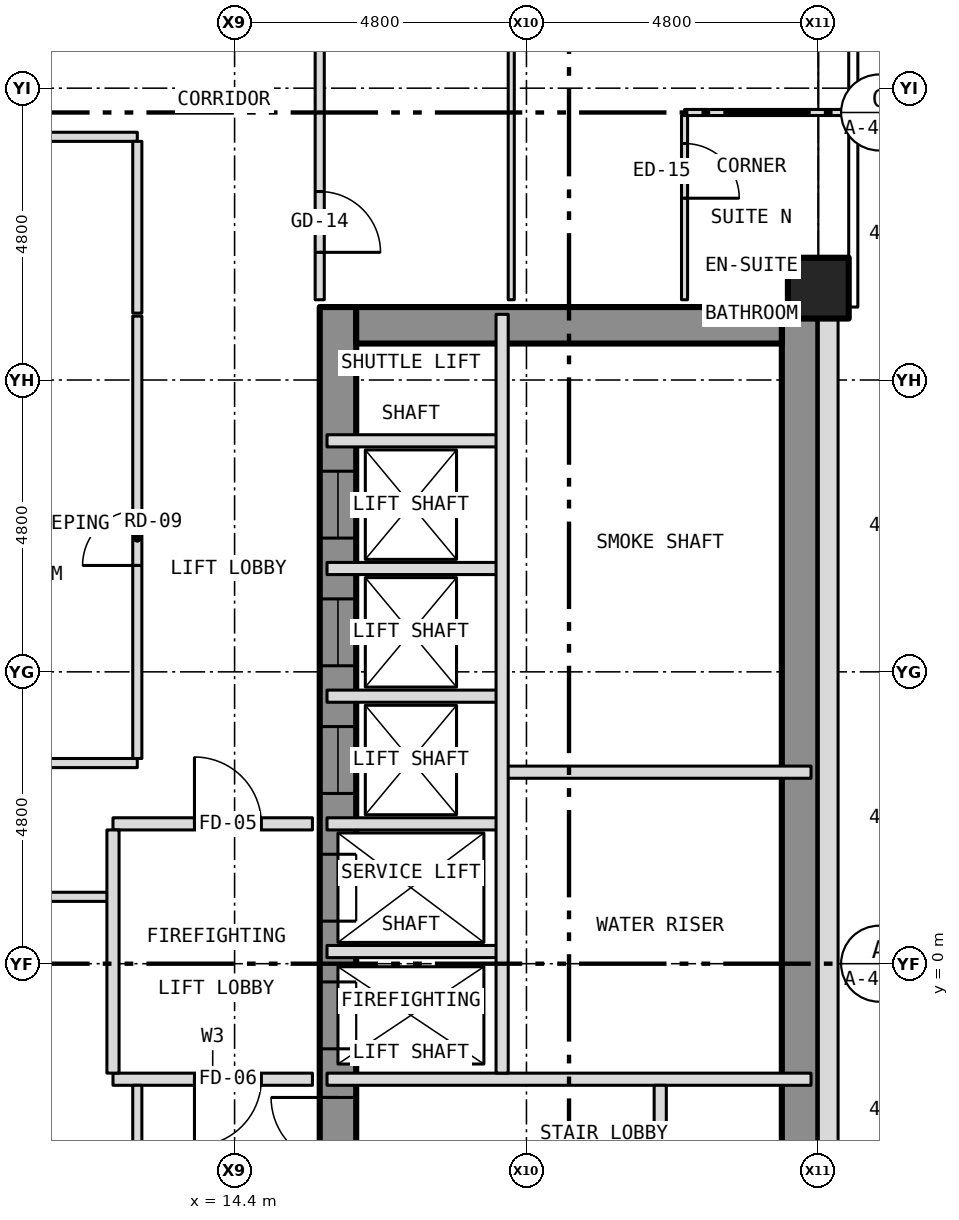
"""IFC4 building model, lengths in metres.
Left out: names, types, materials, properties, quantities, classifications, styles, units other than length and angle.
Written with IfcOpenShell. Run it as: python <this file> out.ifc"""

import sys

from ifc_helpers import new_model, si_unit, direction, frame, frame_2d, origin, origin_2d, place, context, subcontext, project, spatial, rectangle, hollow_rectangle, extrude, element, fill, save


model = new_model("IFC4")
c1 = context("Model", 3, precision=1e-05, world=origin(), true_north=direction((0.0, 1.0)))
c2 = subcontext(c1, "Body", "Model", "MODEL_VIEW")
j1 = project(units=[si_unit("LENGTHUNIT", "METRE"), si_unit("PLANEANGLEUNIT", "RADIAN")], contexts=[c1])
p1 = place(None, origin())
s1 = spatial("IfcSite", under=j1, at=p1, CompositionType="ELEMENT")
p2 = place(p1, origin())
s2 = spatial("IfcBuilding", under=s1, at=p2, CompositionType="ELEMENT")
p3 = place(p2, frame((0.0, 0.0, 46.0)))
s3 = spatial("IfcBuildingStorey", under=s2, at=p3, CompositionType="ELEMENT", Elevation=46.0)
p4 = place(p3, frame((24.0, 11.111, -0.15), z_axis=(0.0, 0.0, 1.0), x_axis=(1.0, 0.0, 0.0)))
e1 = element("IfcColumn", 1, at=p4, inside=s3, PredefinedType="COLUMN", context=c2, shape_type="SweptSolid", body=[
    extrude(hollow_rectangle(XDim=1.0, YDim=1.0, WallThickness=0.06, at=origin_2d()), origin(), (0.0, 0.0, 1.0), 3.5),
])
p5 = place(p3, frame((16.1, -10.8, 0.0), z_axis=(0.0, 0.0, 1.0), x_axis=(0.0, 1.0, 0.0)))
e2 = element("IfcWall", 2, at=p5, inside=s3, PredefinedType="SHEAR", context=c2, shape_type="SweptSolid", body=[
    extrude(rectangle(XDim=21.6, YDim=0.6, at=frame_2d((10.8, 0.0))), origin(), (0.0, 0.0, 1.0), 3.25),
])
p6 = place(p5, frame((9.4, 0.0, 0.0)))
e3 = element("IfcOpeningElement", 3, at=p6, cuts=e2, PredefinedType="OPENING", context=c2, shape_type="SweptSolid", body=[
    extrude(rectangle(XDim=1.1, YDim=2.1, at=frame_2d((0.55, 1.05))), frame((0.0, 0.312, 0.0), z_axis=(0.0, -1.0, 0.0), x_axis=(1.0, 0.0, 0.0)), (0.0, 0.0, 1.0), 0.624),
])
p7 = place(p5, frame((11.5, 0.0, 0.0)))
e4 = element("IfcOpeningElement", 4, at=p7, cuts=e2, PredefinedType="OPENING", context=c2, shape_type="SweptSolid", body=[
    extrude(rectangle(XDim=1.1, YDim=2.1, at=frame_2d((0.55, 1.05))), frame((0.0, 0.312, 0.0), z_axis=(0.0, -1.0, 0.0), x_axis=(1.0, 0.0, 0.0)), (0.0, 0.0, 1.0), 0.624),
])
p8 = place(p5, frame((13.6, 0.0, 0.0)))
e5 = element("IfcOpeningElement", 5, at=p8, cuts=e2, PredefinedType="OPENING", context=c2, shape_type="SweptSolid", body=[
    extrude(rectangle(XDim=1.1, YDim=2.1, at=frame_2d((0.55, 1.05))), frame((0.0, 0.312, 0.0), z_axis=(0.0, -1.0, 0.0), x_axis=(1.0, 0.0, 0.0)), (0.0, 0.0, 1.0), 0.624),
])
p9 = place(p5, frame((15.7, 0.0, 0.0)))
e6 = element("IfcOpeningElement", 6, at=p9, cuts=e2, PredefinedType="OPENING", context=c2, shape_type="SweptSolid", body=[
    extrude(rectangle(XDim=1.1, YDim=2.1, at=frame_2d((0.55, 1.05))), frame((0.0, 0.312, 0.0), z_axis=(0.0, -1.0, 0.0), x_axis=(1.0, 0.0, 0.0)), (0.0, 0.0, 1.0), 0.624),
])
p10 = place(p5, frame((17.8, 0.0, 0.0)))
e7 = element("IfcOpeningElement", 7, at=p10, cuts=e2, PredefinedType="OPENING", context=c2, shape_type="SweptSolid", body=[
    extrude(rectangle(XDim=1.1, YDim=2.1, at=frame_2d((0.55, 1.05))), frame((0.0, 0.312, 0.0), z_axis=(0.0, -1.0, 0.0), x_axis=(1.0, 0.0, 0.0)), (0.0, 0.0, 1.0), 0.624),
])
p11 = place(p5, frame((5.642, 0.0, 0.0)))
e8 = element("IfcOpeningElement", 8, at=p11, cuts=e2, PredefinedType="OPENING", context=c2, shape_type="SweptSolid", body=[
    extrude(rectangle(XDim=1.1, YDim=2.1, at=frame_2d((0.55, 1.05))), frame((0.0, 0.312, 0.0), z_axis=(0.0, -1.0, 0.0), x_axis=(1.0, 0.0, 0.0)), (0.0, 0.0, 1.0), 0.624),
])
p12 = place(p5, frame((7.5, 0.0, 0.0)))
e9 = element("IfcOpeningElement", 9, at=p12, cuts=e2, PredefinedType="OPENING", context=c2, shape_type="SweptSolid", body=[
    extrude(rectangle(XDim=1.1, YDim=2.1, at=frame_2d((0.55, 1.05))), frame((0.0, 0.312, 0.0), z_axis=(0.0, -1.0, 0.0), x_axis=(1.0, 0.0, 0.0)), (0.0, 0.0, 1.0), 0.624),
])
p13 = place(p3, frame((23.7, -10.8, 0.0), z_axis=(0.0, 0.0, 1.0), x_axis=(0.0, 1.0, 0.0)))
e10 = element("IfcWall", 10, at=p13, inside=s3, PredefinedType="SHEAR", context=c2, shape_type="SweptSolid", body=[
    extrude(rectangle(XDim=21.6, YDim=0.6, at=frame_2d((10.8, 0.0))), origin(), (0.0, 0.0, 1.0), 3.25),
])
p14 = place(p3, frame((16.4, 10.5, 0.0), z_axis=(0.0, 0.0, 1.0), x_axis=(1.0, 0.0, 0.0)))
e11 = element("IfcWall", 11, at=p14, inside=s3, PredefinedType="SHEAR", context=c2, shape_type="SweptSolid", body=[
    extrude(rectangle(XDim=7.0, YDim=0.6, at=frame_2d((3.5, 0.0))), origin(), (0.0, 0.0, 1.0), 3.25),
])
p15 = place(p3, frame((24.163, -10.8, 0.0), z_axis=(0.0, 0.0, 1.0), x_axis=(0.0, 1.0, 0.0)))
e12 = element("IfcWall", 12, at=p15, inside=s3, PredefinedType="SOLIDWALL", context=c2, shape_type="SweptSolid", body=[
    extrude(rectangle(XDim=21.6, YDim=0.325, at=frame_2d((10.8, 0.0))), origin(), (0.0, 0.0, 1.0), 3.5),
])
p16 = place(p15, frame((2.95, 0.0, 1.0)))
e13 = element("IfcOpeningElement", 13, at=p16, cuts=e12, PredefinedType="OPENING", context=c2, shape_type="SweptSolid", body=[
    extrude(rectangle(XDim=0.6, YDim=1.5, at=frame_2d((0.3, 0.75))), frame((0.0, 0.175, 0.0), z_axis=(0.0, -1.0, 0.0), x_axis=(1.0, 0.0, 0.0)), (0.0, 0.0, 1.0), 0.349),
])
p17 = place(p3, frame((12.4, -1.9, 0.0), z_axis=(0.0, 0.0, 1.0), x_axis=(1.0, 0.0, 0.0)))
e14 = element("IfcWall", 14, at=p17, inside=s3, PredefinedType="PARTITIONING", context=c2, shape_type="SweptSolid", body=[
    extrude(rectangle(XDim=3.28, YDim=0.2, at=frame_2d((1.64, 0.0))), origin(), (0.0, 0.0, 1.0), 3.35),
])
p18 = place(p17, frame((1.34, 0.0, 0.0)))
e15 = element("IfcOpeningElement", 15, at=p18, cuts=e14, PredefinedType="OPENING", context=c2, shape_type="SweptSolid", body=[
    extrude(rectangle(XDim=1.1, YDim=2.1, at=frame_2d((0.55, 1.05))), frame((0.0, 0.112, 0.0), z_axis=(0.0, -1.0, 0.0), x_axis=(1.0, 0.0, 0.0)), (0.0, 0.0, 1.0), 0.224),
])
p19 = place(p3, frame((15.92, -1.9, 0.0), z_axis=(0.0, 0.0, 1.0), x_axis=(1.0, 0.0, 0.0)))
e16 = element("IfcWall", 16, at=p19, inside=s3, PredefinedType="PARTITIONING", context=c2, shape_type="SweptSolid", body=[
    extrude(rectangle(XDim=7.96, YDim=0.2, at=frame_2d((3.98, 0.0))), origin(), (0.0, 0.0, 1.0), 3.25),
])
p20 = place(p3, frame((15.92, 0.2, 0.0), z_axis=(0.0, 0.0, 1.0), x_axis=(1.0, 0.0, 0.0)))
e17 = element("IfcWall", 17, at=p20, inside=s3, PredefinedType="PARTITIONING", context=c2, shape_type="SweptSolid", body=[
    extrude(rectangle(XDim=2.88, YDim=0.2, at=frame_2d((1.44, 0.0))), origin(), (0.0, 0.0, 1.0), 3.25),
])
p21 = place(p3, frame((-12.4, 1.1, 0.0), z_axis=(0.0, 0.0, 1.0), x_axis=(1.0, 0.0, 0.0)))
e18 = element("IfcWall", 18, at=p21, inside=s3, PredefinedType="PARTITIONING", context=c2, shape_type="SweptSolid", body=[
    extrude(rectangle(XDim=24.8, YDim=0.15, at=frame_2d((12.4, 0.0))), origin(), (0.0, 0.0, 1.0), 3.35),
])
p22 = place(p3, frame((12.4, 2.3, 0.0), z_axis=(0.0, 0.0, 1.0), x_axis=(1.0, 0.0, 0.0)))
e19 = element("IfcWall", 19, at=p22, inside=s3, PredefinedType="PARTITIONING", context=c2, shape_type="SweptSolid", body=[
    extrude(rectangle(XDim=3.28, YDim=0.2, at=frame_2d((1.64, 0.0))), origin(), (0.0, 0.0, 1.0), 3.35),
])
p23 = place(p22, frame((1.34, 0.0, 0.0)))
e20 = element("IfcOpeningElement", 20, at=p23, cuts=e19, PredefinedType="OPENING", context=c2, shape_type="SweptSolid", body=[
    extrude(rectangle(XDim=1.1, YDim=2.1, at=frame_2d((0.55, 1.05))), frame((0.0, 0.112, 0.0), z_axis=(0.0, -1.0, 0.0), x_axis=(1.0, 0.0, 0.0)), (0.0, 0.0, 1.0), 0.224),
])
p24 = place(p3, frame((15.92, 2.3, 0.0), z_axis=(0.0, 0.0, 1.0), x_axis=(1.0, 0.0, 0.0)))
e21 = element("IfcWall", 21, at=p24, inside=s3, PredefinedType="PARTITIONING", context=c2, shape_type="SweptSolid", body=[
    extrude(rectangle(XDim=2.88, YDim=0.2, at=frame_2d((1.44, 0.0))), origin(), (0.0, 0.0, 1.0), 3.25),
])
p25 = place(p3, frame((18.8, 3.15, 0.0), z_axis=(0.0, 0.0, 1.0), x_axis=(1.0, 0.0, 0.0)))
e22 = element("IfcWall", 22, at=p25, inside=s3, PredefinedType="PARTITIONING", context=c2, shape_type="SweptSolid", body=[
    extrude(rectangle(XDim=5.08, YDim=0.2, at=frame_2d((2.54, 0.0))), origin(), (0.0, 0.0, 1.0), 3.25),
])
p26 = place(p3, frame((-12.8, 3.3, 0.0), z_axis=(0.0, 0.0, 1.0), x_axis=(1.0, 0.0, 0.0)))
e23 = element("IfcWall", 23, at=p26, inside=s3, PredefinedType="PARTITIONING", context=c2, shape_type="SweptSolid", body=[
    extrude(rectangle(XDim=25.6, YDim=0.15, at=frame_2d((12.8, 0.0))), origin(), (0.0, 0.0, 1.0), 3.35),
])
p27 = place(p26, frame((1.95, 0.0, 0.0)))
e24 = element("IfcOpeningElement", 24, at=p27, cuts=e23, PredefinedType="OPENING", context=c2, shape_type="SweptSolid", body=[
    extrude(rectangle(XDim=0.9, YDim=2.1, at=frame_2d((0.45, 1.05))), frame((0.0, 0.087, 0.0), z_axis=(0.0, -1.0, 0.0), x_axis=(1.0, 0.0, 0.0)), (0.0, 0.0, 1.0), 0.174),
])
for number, where, z_axis, x_axis in (
    (25, (15.92, 4.4, 0.0), (0.0, 0.0, 1.0), (1.0, 0.0, 0.0)),
    (26, (15.92, 6.5, 0.0), (0.0, 0.0, 1.0), (1.0, 0.0, 0.0)),
    (27, (15.92, 8.6, 0.0), (0.0, 0.0, 1.0), (1.0, 0.0, 0.0)),
):
    element("IfcWall", number, at=place(p3, frame(where, z_axis=z_axis, x_axis=x_axis)), inside=s3, PredefinedType="PARTITIONING", context=c2, shape_type="SweptSolid", body=[
        extrude(rectangle(XDim=2.88, YDim=0.2, at=frame_2d((1.44, 0.0))), origin(), (0.0, 0.0, 1.0), 3.25),
    ])
p28 = place(p3, frame((-12.8, 13.6, 0.0), z_axis=(0.0, 0.0, 1.0), x_axis=(1.0, 0.0, 0.0)))
e28 = element("IfcWall", 28, at=p28, inside=s3, PredefinedType="PARTITIONING", context=c2, shape_type="SweptSolid", body=[
    extrude(rectangle(XDim=25.6, YDim=0.15, at=frame_2d((12.8, 0.0))), origin(), (0.0, 0.0, 1.0), 3.35),
])
p29 = place(p28, frame((12.35, 0.0, 0.0)))
e29 = element("IfcOpeningElement", 29, at=p29, cuts=e28, PredefinedType="OPENING", context=c2, shape_type="SweptSolid", body=[
    extrude(rectangle(XDim=0.9, YDim=2.1, at=frame_2d((0.45, 1.05))), frame((0.0, 0.087, 0.0), z_axis=(0.0, -1.0, 0.0), x_axis=(1.0, 0.0, 0.0)), (0.0, 0.0, 1.0), 0.174),
])
p30 = place(p3, frame((21.8, 14.0, 0.0), z_axis=(0.0, 0.0, 1.0), x_axis=(1.0, 0.0, 0.0)))
e30 = element("IfcWall", 30, at=p30, inside=s3, PredefinedType="PARTITIONING", context=c2, shape_type="SweptSolid", body=[
    extrude(rectangle(XDim=2.73, YDim=0.1, at=frame_2d((1.365, 0.0))), origin(), (0.0, 0.0, 1.0), 3.35),
])
p31 = place(p3, frame((12.4, -1.8, 0.0), z_axis=(0.0, 0.0, 1.0), x_axis=(0.0, 1.0, 0.0)))
e31 = element("IfcWall", 31, at=p31, inside=s3, PredefinedType="PARTITIONING", context=c2, shape_type="SweptSolid", body=[
    extrude(rectangle(XDim=4.0, YDim=0.2, at=frame_2d((2.0, 0.0))), origin(), (0.0, 0.0, 1.0), 3.35),
])
p32 = place(p3, frame((12.8, -13.525, 0.0), z_axis=(0.0, 0.0, 1.0), x_axis=(0.0, 1.0, 0.0)))
e32 = element("IfcWall", 32, at=p32, inside=s3, PredefinedType="PARTITIONING", context=c2, shape_type="SweptSolid", body=[
    extrude(rectangle(XDim=11.525, YDim=0.15, at=frame_2d((5.762, 0.0))), origin(), (0.0, 0.0, 1.0), 3.35),
])
p33 = place(p32, frame((6.725, 0.0, 0.0)))
e33 = element("IfcOpeningElement", 33, at=p33, cuts=e32, PredefinedType="OPENING", context=c2, shape_type="SweptSolid", body=[
    extrude(rectangle(XDim=0.9, YDim=2.1, at=frame_2d((0.45, 1.05))), frame((0.0, 0.087, 0.0), z_axis=(0.0, -1.0, 0.0), x_axis=(1.0, 0.0, 0.0)), (0.0, 0.0, 1.0), 0.174),
])
p34 = place(p3, frame((12.8, 3.375, 0.0), z_axis=(0.0, 0.0, 1.0), x_axis=(0.0, 1.0, 0.0)))
e34 = element("IfcWall", 34, at=p34, inside=s3, PredefinedType="PARTITIONING", context=c2, shape_type="SweptSolid", body=[
    extrude(rectangle(XDim=7.275, YDim=0.15, at=frame_2d((3.637, 0.0))), origin(), (0.0, 0.0, 1.0), 3.35),
])
p35 = place(p34, frame((3.175, 0.0, 0.0)))
e35 = element("IfcOpeningElement", 35, at=p35, cuts=e34, PredefinedType="OPENING", context=c2, shape_type="SweptSolid", body=[
    extrude(rectangle(XDim=0.9, YDim=2.1, at=frame_2d((0.45, 1.05))), frame((0.0, 0.087, 0.0), z_axis=(0.0, -1.0, 0.0), x_axis=(1.0, 0.0, 0.0)), (0.0, 0.0, 1.0), 0.174),
])
p36 = place(p3, frame((12.8, 10.7, 0.0), z_axis=(0.0, 0.0, 1.0), x_axis=(0.0, 1.0, 0.0)))
e36 = element("IfcWall", 36, at=p36, inside=s3, PredefinedType="PARTITIONING", context=c2, shape_type="SweptSolid", body=[
    extrude(rectangle(XDim=2.825, YDim=0.15, at=frame_2d((1.413, 0.0))), origin(), (0.0, 0.0, 1.0), 3.35),
])
p37 = place(p3, frame((15.8, 10.92, 0.0), z_axis=(0.0, 0.0, 1.0), x_axis=(0.0, 1.0, 0.0)))
e37 = element("IfcWall", 37, at=p37, inside=s3, PredefinedType="PARTITIONING", context=c2, shape_type="SweptSolid", body=[
    extrude(rectangle(XDim=4.805, YDim=0.15, at=frame_2d((2.403, 0.0))), origin(), (0.0, 0.0, 1.0), 3.35),
])
p38 = place(p37, frame((0.78, 0.0, 0.0)))
e38 = element("IfcOpeningElement", 38, at=p38, cuts=e37, PredefinedType="OPENING", context=c2, shape_type="SweptSolid", body=[
    extrude(rectangle(XDim=1.0, YDim=2.1, at=frame_2d((0.5, 1.05))), frame((0.0, 0.087, 0.0), z_axis=(0.0, -1.0, 0.0), x_axis=(1.0, 0.0, 0.0)), (0.0, 0.0, 1.0), 0.174),
])
p39 = place(p3, frame((18.8, -1.8, 0.0), z_axis=(0.0, 0.0, 1.0), x_axis=(0.0, 1.0, 0.0)))
e39 = element("IfcWall", 39, at=p39, inside=s3, PredefinedType="PARTITIONING", context=c2, shape_type="SweptSolid", body=[
    extrude(rectangle(XDim=12.48, YDim=0.2, at=frame_2d((6.24, 0.0))), origin(), (0.0, 0.0, 1.0), 3.25),
])
p40 = place(p3, frame((18.95, 10.92, 0.0), z_axis=(0.0, 0.0, 1.0), x_axis=(0.0, 1.0, 0.0)))
e40 = element("IfcWall", 40, at=p40, inside=s3, PredefinedType="PARTITIONING", context=c2, shape_type="SweptSolid", body=[
    extrude(rectangle(XDim=13.61, YDim=0.1, at=frame_2d((6.805, 0.0))), origin(), (0.0, 0.0, 1.0), 3.35),
])
p41 = place(p40, frame((6.03, 0.0, 0.0)))
e41 = element("IfcOpeningElement", 41, at=p41, cuts=e40, PredefinedType="OPENING", context=c2, shape_type="SweptSolid", body=[
    extrude(rectangle(XDim=0.9, YDim=2.1, at=frame_2d((0.45, 1.05))), frame((0.0, 0.062, 0.0), z_axis=(0.0, -1.0, 0.0), x_axis=(1.0, 0.0, 0.0)), (0.0, 0.0, 1.0), 0.124),
])
p42 = place(p3, frame((21.4, -10.68, 0.0), z_axis=(0.0, 0.0, 1.0), x_axis=(0.0, 1.0, 0.0)))
e42 = element("IfcWall", 42, at=p42, inside=s3, PredefinedType="PARTITIONING", context=c2, shape_type="SweptSolid", body=[
    extrude(rectangle(XDim=8.68, YDim=0.2, at=frame_2d((4.34, 0.0))), origin(), (0.0, 0.0, 1.0), 3.25),
])
p43 = place(p42, frame((0.899, 0.0, 0.0)))
e43 = element("IfcOpeningElement", 43, at=p43, cuts=e42, PredefinedType="OPENING", context=c2, shape_type="SweptSolid", body=[
    extrude(rectangle(XDim=0.9, YDim=2.1, at=frame_2d((0.45, 1.05))), frame((0.0, 0.112, 0.0), z_axis=(0.0, -1.0, 0.0), x_axis=(1.0, 0.0, 0.0)), (0.0, 0.0, 1.0), 0.224),
])
p44 = place(p42, frame((5.349, 0.0, 0.0)))
e44 = element("IfcOpeningElement", 44, at=p44, cuts=e42, PredefinedType="OPENING", context=c2, shape_type="SweptSolid", body=[
    extrude(rectangle(XDim=0.9, YDim=2.1, at=frame_2d((0.45, 1.05))), frame((0.0, 0.112, 0.0), z_axis=(0.0, -1.0, 0.0), x_axis=(1.0, 0.0, 0.0)), (0.0, 0.0, 1.0), 0.224),
])
p45 = place(p3, frame((21.8, 10.92, 0.0), z_axis=(0.0, 0.0, 1.0), x_axis=(0.0, 1.0, 0.0)))
e45 = element("IfcWall", 45, at=p45, inside=s3, PredefinedType="PARTITIONING", context=c2, shape_type="SweptSolid", body=[
    extrude(rectangle(XDim=3.03, YDim=0.1, at=frame_2d((1.515, 0.0))), origin(), (0.0, 0.0, 1.0), 3.35),
])
p46 = place(p45, frame((1.67, 0.0, 0.0)))
e46 = element("IfcOpeningElement", 46, at=p46, cuts=e45, PredefinedType="OPENING", context=c2, shape_type="SweptSolid", body=[
    extrude(rectangle(XDim=0.9, YDim=2.1, at=frame_2d((0.45, 1.05))), frame((0.0, 0.062, 0.0), z_axis=(0.0, -1.0, 0.0), x_axis=(1.0, 0.0, 0.0)), (0.0, 0.0, 1.0), 0.124),
])
p47 = place(p6, origin())
e47 = element("IfcDoor", 47, at=p47, inside=s3, OperationType="SLIDING_TO_LEFT", PredefinedType="DOOR", context=c2, shape_type="SweptSolid", body=[
    extrude(rectangle(XDim=1.1, YDim=2.1, at=frame_2d((0.55, 1.05))), frame((0.0, 0.025, 0.0), z_axis=(0.0, -1.0, 0.0), x_axis=(1.0, 0.0, 0.0)), (0.0, 0.0, 1.0), 0.05),
])
fill(e3, e47)
p48 = place(p7, origin())
e48 = element("IfcDoor", 48, at=p48, inside=s3, OperationType="SLIDING_TO_LEFT", PredefinedType="DOOR", context=c2, shape_type="SweptSolid", body=[
    extrude(rectangle(XDim=1.1, YDim=2.1, at=frame_2d((0.55, 1.05))), frame((0.0, 0.025, 0.0), z_axis=(0.0, -1.0, 0.0), x_axis=(1.0, 0.0, 0.0)), (0.0, 0.0, 1.0), 0.05),
])
fill(e4, e48)
p49 = place(p8, origin())
e49 = element("IfcDoor", 49, at=p49, inside=s3, OperationType="SLIDING_TO_LEFT", PredefinedType="DOOR", context=c2, shape_type="SweptSolid", body=[
    extrude(rectangle(XDim=1.1, YDim=2.1, at=frame_2d((0.55, 1.05))), frame((0.0, 0.025, 0.0), z_axis=(0.0, -1.0, 0.0), x_axis=(1.0, 0.0, 0.0)), (0.0, 0.0, 1.0), 0.05),
])
fill(e5, e49)
p50 = place(p9, origin())
e50 = element("IfcDoor", 50, at=p50, inside=s3, OperationType="SLIDING_TO_LEFT", PredefinedType="DOOR", context=c2, shape_type="SweptSolid", body=[
    extrude(rectangle(XDim=1.1, YDim=2.1, at=frame_2d((0.55, 1.05))), frame((0.0, 0.025, 0.0), z_axis=(0.0, -1.0, 0.0), x_axis=(1.0, 0.0, 0.0)), (0.0, 0.0, 1.0), 0.05),
])
fill(e6, e50)
p51 = place(p10, origin())
e51 = element("IfcDoor", 51, at=p51, inside=s3, OperationType="SLIDING_TO_LEFT", PredefinedType="DOOR", context=c2, shape_type="SweptSolid", body=[
    extrude(rectangle(XDim=1.1, YDim=2.1, at=frame_2d((0.55, 1.05))), frame((0.0, 0.025, 0.0), z_axis=(0.0, -1.0, 0.0), x_axis=(1.0, 0.0, 0.0)), (0.0, 0.0, 1.0), 0.05),
])
fill(e7, e51)
p52 = place(p12, origin())
e52 = element("IfcDoor", 52, at=p52, inside=s3, OperationType="SINGLE_SWING_RIGHT", PredefinedType="DOOR", context=c2, shape_type="SweptSolid", body=[
    extrude(rectangle(XDim=1.1, YDim=2.1, at=frame_2d((0.55, 1.05))), frame((0.0, 0.025, 0.0), z_axis=(0.0, -1.0, 0.0), x_axis=(1.0, 0.0, 0.0)), (0.0, 0.0, 1.0), 0.05),
])
fill(e9, e52)
p53 = place(p23, origin())
e53 = element("IfcDoor", 53, at=p53, inside=s3, OperationType="SINGLE_SWING_LEFT", PredefinedType="DOOR", context=c2, shape_type="SweptSolid", body=[
    extrude(rectangle(XDim=1.1, YDim=2.1, at=frame_2d((0.55, 1.05))), frame((0.0, 0.025, 0.0), z_axis=(0.0, -1.0, 0.0), x_axis=(1.0, 0.0, 0.0)), (0.0, 0.0, 1.0), 0.05),
])
fill(e20, e53)
p54 = place(p18, origin())
e54 = element("IfcDoor", 54, at=p54, inside=s3, OperationType="SINGLE_SWING_LEFT", PredefinedType="DOOR", context=c2, shape_type="SweptSolid", body=[
    extrude(rectangle(XDim=1.1, YDim=2.1, at=frame_2d((0.55, 1.05))), frame((0.0, 0.025, 0.0), z_axis=(0.0, -1.0, 0.0), x_axis=(1.0, 0.0, 0.0)), (0.0, 0.0, 1.0), 0.05),
])
fill(e15, e54)
p55 = place(p38, origin())
e55 = element("IfcDoor", 55, at=p55, inside=s3, OperationType="SINGLE_SWING_LEFT", PredefinedType="DOOR", context=c2, shape_type="SweptSolid", body=[
    extrude(rectangle(XDim=1.0, YDim=2.1, at=frame_2d((0.5, 1.05))), frame((0.0, 0.025, 0.0), z_axis=(0.0, -1.0, 0.0), x_axis=(1.0, 0.0, 0.0)), (0.0, 0.0, 1.0), 0.05),
])
fill(e38, e55)
p56 = place(p46, origin())
e56 = element("IfcDoor", 56, at=p56, inside=s3, OperationType="SINGLE_SWING_LEFT", PredefinedType="DOOR", context=c2, shape_type="SweptSolid", body=[
    extrude(rectangle(XDim=0.9, YDim=2.1, at=frame_2d((0.45, 1.05))), frame((0.0, 0.025, 0.0), z_axis=(0.0, -1.0, 0.0), x_axis=(1.0, 0.0, 0.0)), (0.0, 0.0, 1.0), 0.05),
])
fill(e46, e56)
p57 = place(p35, origin())
e57 = element("IfcDoor", 57, at=p57, inside=s3, OperationType="SINGLE_SWING_LEFT", PredefinedType="DOOR", context=c2, shape_type="SweptSolid", body=[
    extrude(rectangle(XDim=0.9, YDim=2.1, at=frame_2d((0.45, 1.05))), frame((0.0, 0.025, 0.0), z_axis=(0.0, -1.0, 0.0), x_axis=(1.0, 0.0, 0.0)), (0.0, 0.0, 1.0), 0.05),
])
fill(e35, e57)
save(model, sys.argv[1])
